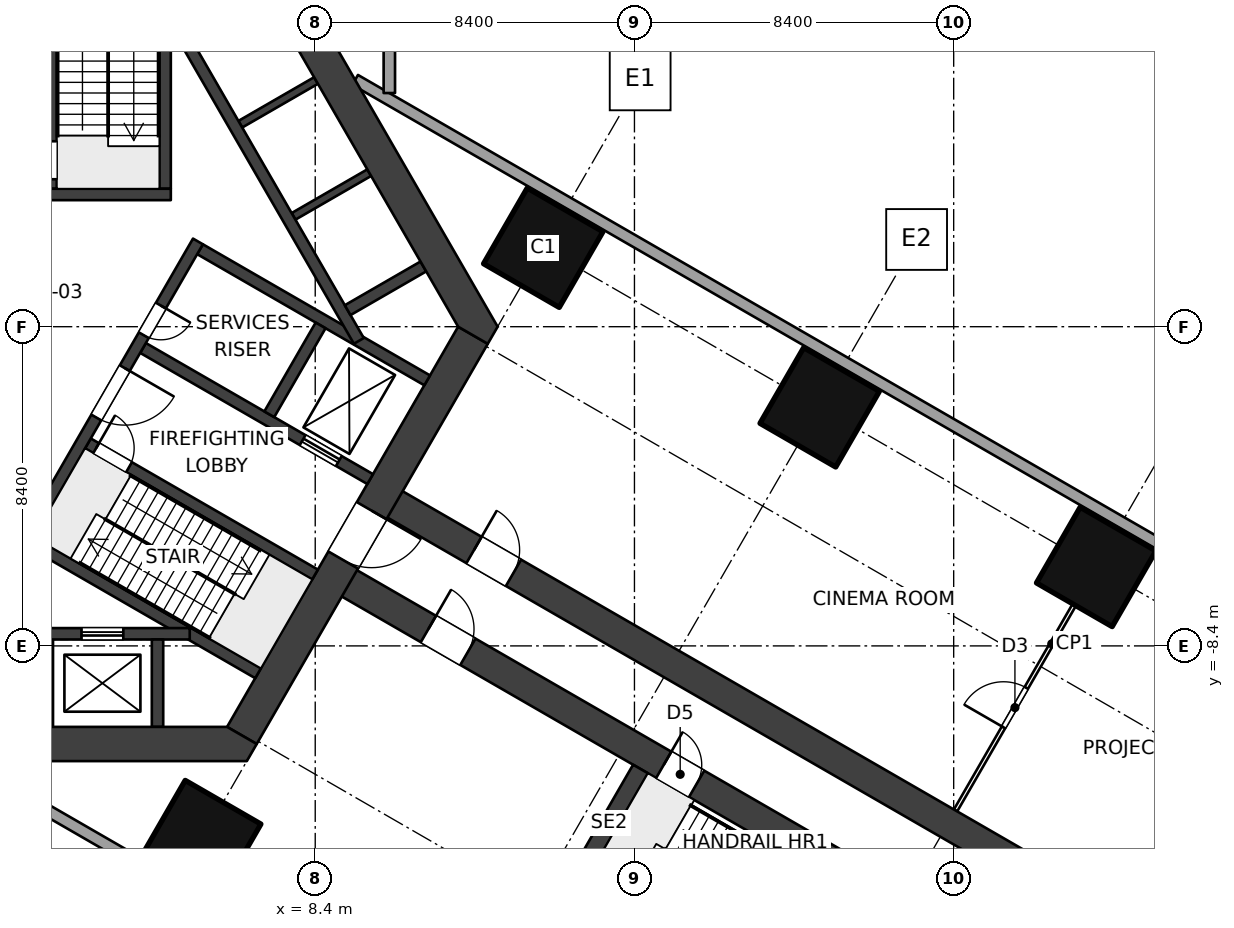
"""IFC4 building model, lengths in metres.
Left out: names, types, materials, properties, quantities, classifications, styles, units other than length and angle.
Written with IfcOpenShell. Run it as: python <this file> out.ifc"""

import sys

from ifc_helpers import new_model, si_unit, direction, frame, frame_2d, origin, origin_2d, place, context, subcontext, project, spatial, polyline, rectangle, outline, extrude, element, fill, save


model = new_model("IFC4")
c1 = context("Model", 3, precision=1e-05, world=origin(), true_north=direction((0.0, 1.0)))
c2 = subcontext(c1, "Body", "Model", "MODEL_VIEW")
j1 = project(units=[si_unit("LENGTHUNIT", "METRE"), si_unit("PLANEANGLEUNIT", "RADIAN")], contexts=[c1])
p1 = place(None, origin())
s1 = spatial("IfcSite", under=j1, at=p1, CompositionType="ELEMENT")
p2 = place(p1, origin())
s2 = spatial("IfcBuilding", under=s1, at=p2, CompositionType="ELEMENT")
p3 = place(p2, frame((0.0, 0.0, 6.0)))
s3 = spatial("IfcBuildingStorey", under=s2, at=p3, CompositionType="ELEMENT", Elevation=6.0)
for number, where, z_axis, x_axis in (
    (1, (14.4, 2.078, 0.0), (0.0, 0.0, 1.0), (-0.5, -0.866, 0.0)),
    (2, (5.4, -13.51, 0.0), (0.0, 0.0, 1.0), (-0.5, -0.866, 0.0)),
    (3, (21.675, -2.122, 0.0), (0.0, 0.0, 1.0), (-0.5, -0.866, 0.0)),
    (4, (28.949, -6.322, 0.0), (0.0, 0.0, 1.0), (-0.5, -0.866, 0.0)),
):
    element("IfcColumn", number, at=place(p3, frame(where, z_axis=z_axis, x_axis=x_axis)), inside=s3, PredefinedType="COLUMN", context=c2, shape_type="SweptSolid", body=[
        extrude(rectangle(XDim=2.3, YDim=2.3, at=origin_2d()), origin(), (0.0, 0.0, 1.0), 5.0),
    ])
p4 = place(p3, frame((12.551, -0.225, 0.0), z_axis=(0.0, 0.0, 1.0), x_axis=(-0.499997612506, -0.8660267822, 0.0)))
e5 = element("IfcWall", 5, at=p4, inside=s3, PredefinedType="SHEAR", context=c2, shape_type="SweptSolid", body=[
    extrude(rectangle(XDim=12.161, YDim=0.9, at=frame_2d((6.08, 0.0))), origin(), (0.0, 0.0, 1.0), 5.0),
])
p5 = place(p4, frame((5.33, 0.0, 0.0)))
e6 = element("IfcOpeningElement", 6, at=p5, cuts=e5, PredefinedType="OPENING", context=c2, shape_type="SweptSolid", body=[
    extrude(rectangle(XDim=1.5, YDim=2.1, at=frame_2d((0.75, 1.05))), frame((0.0, 0.46, 0.0), z_axis=(0.0, -1.0, 0.0), x_axis=(1.0, 0.0, 0.0)), (0.0, 0.0, 1.0), 0.92),
])
p6 = place(p3, origin())
e7 = element("IfcWall", 7, at=p6, inside=s3, PredefinedType="SHEAR", context=c2, shape_type="SweptSolid", body=[
    extrude(outline(polyline([(-6.6, -11.432), (6.6, -11.432), (6.86, -10.981), (6.08, -10.531), (-6.08, -10.531), (-6.86, -10.981), (-6.6, -11.432)])), origin(), (0.0, 0.0, 1.0), 5.0),
])
p7 = place(p3, origin())
e8 = element("IfcWall", 8, at=p7, inside=s3, PredefinedType="SHEAR", context=c2, shape_type="SweptSolid", body=[
    extrude(outline(polyline([(13.2, 0.0), (6.6, 11.432), (6.08, 11.432), (6.08, 10.531), (12.161, 0.0), (12.94, -0.45), (13.2, 0.0)])), origin(), (0.0, 0.0, 1.0), 5.0),
])
p8 = place(p3, frame((-4.6, 3.48, 0.0), z_axis=(0.0, 0.0, 1.0), x_axis=(1.0, 0.0, 0.0)))
e9 = element("IfcWall", 9, at=p8, inside=s3, PredefinedType="SHEAR", context=c2, shape_type="SweptSolid", body=[
    extrude(rectangle(XDim=9.2, YDim=0.3, at=frame_2d((4.6, 0.0))), origin(), (0.0, 0.0, 1.0), 5.0),
])
p9 = place(p8, frame((3.85, 0.0, 0.0)))
e10 = element("IfcOpeningElement", 10, at=p9, cuts=e9, PredefinedType="OPENING", context=c2, shape_type="SweptSolid", body=[
    extrude(rectangle(XDim=1.5, YDim=2.1, at=frame_2d((0.75, 1.05))), frame((0.0, 0.16, 0.0), z_axis=(0.0, -1.0, 0.0), x_axis=(1.0, 0.0, 0.0)), (0.0, 0.0, 1.0), 0.32),
])
p10 = place(p8, frame((1.95, 0.0, 0.0)))
e11 = element("IfcOpeningElement", 11, at=p10, cuts=e9, PredefinedType="OPENING", context=c2, shape_type="SweptSolid", body=[
    extrude(rectangle(XDim=0.9, YDim=2.1, at=frame_2d((0.45, 1.05))), frame((0.0, 0.16, 0.0), z_axis=(0.0, -1.0, 0.0), x_axis=(1.0, 0.0, 0.0)), (0.0, 0.0, 1.0), 0.32),
])
p11 = place(p3, frame((1.45, 3.63, 0.0), z_axis=(0.0, 0.0, 1.0), x_axis=(0.0, 1.0, 0.0)))
e12 = element("IfcWall", 12, at=p11, inside=s3, PredefinedType="SHEAR", context=c2, shape_type="SweptSolid", body=[
    extrude(rectangle(XDim=6.902, YDim=0.3, at=frame_2d((3.451, 0.0))), origin(), (0.0, 0.0, 1.0), 5.0),
])
p12 = place(p11, frame((0.25, 0.0, 0.0)))
e13 = element("IfcOpeningElement", 13, at=p12, cuts=e12, PredefinedType="OPENING", context=c2, shape_type="SweptSolid", body=[
    extrude(rectangle(XDim=1.0, YDim=2.1, at=frame_2d((0.5, 1.05))), frame((0.0, 0.16, 0.0), z_axis=(0.0, -1.0, 0.0), x_axis=(1.0, 0.0, 0.0)), (0.0, 0.0, 1.0), 0.32),
])
p13 = place(p3, frame((4.45, 3.63, 0.0), z_axis=(0.0, 0.0, 1.0), x_axis=(0.0, 1.0, 0.0)))
e14 = element("IfcWall", 14, at=p13, inside=s3, PredefinedType="SHEAR", context=c2, shape_type="SweptSolid", body=[
    extrude(rectangle(XDim=6.902, YDim=0.3, at=frame_2d((3.451, 0.0))), origin(), (0.0, 0.0, 1.0), 5.0),
])
p14 = place(p3, frame((5.314, 2.244, 0.0), z_axis=(0.0, 0.0, 1.0), x_axis=(-0.499995050369, -0.866028261437, 0.0)))
e15 = element("IfcWall", 15, at=p14, inside=s3, PredefinedType="SHEAR", context=c2, shape_type="SweptSolid", body=[
    extrude(rectangle(XDim=9.2, YDim=0.3, at=frame_2d((4.6, 0.0))), origin(), (0.0, 0.0, 1.0), 5.0),
])
p15 = place(p14, frame((3.85, 0.0, 0.0)))
e16 = element("IfcOpeningElement", 16, at=p15, cuts=e15, PredefinedType="OPENING", context=c2, shape_type="SweptSolid", body=[
    extrude(rectangle(XDim=1.5, YDim=2.1, at=frame_2d((0.75, 1.05))), frame((0.0, 0.16, 0.0), z_axis=(0.0, -1.0, 0.0), x_axis=(1.0, 0.0, 0.0)), (0.0, 0.0, 1.0), 0.32),
])
p16 = place(p14, frame((1.95, 0.0, 0.0)))
e17 = element("IfcOpeningElement", 17, at=p16, cuts=e15, PredefinedType="OPENING", context=c2, shape_type="SweptSolid", body=[
    extrude(rectangle(XDim=0.9, YDim=2.1, at=frame_2d((0.45, 1.05))), frame((0.0, 0.16, 0.0), z_axis=(0.0, -1.0, 0.0), x_axis=(1.0, 0.0, 0.0)), (0.0, 0.0, 1.0), 0.32),
])
p17 = place(p3, frame((2.419, -3.071, 0.0), z_axis=(0.0, 0.0, 1.0), x_axis=(0.86602711848, -0.499997030048, 0.0)))
e18 = element("IfcWall", 18, at=p17, inside=s3, PredefinedType="SHEAR", context=c2, shape_type="SweptSolid", body=[
    extrude(rectangle(XDim=6.901, YDim=0.3, at=frame_2d((3.451, 0.0))), origin(), (0.0, 0.0, 1.0), 5.0),
])
p18 = place(p17, frame((0.25, 0.0, 0.0)))
e19 = element("IfcOpeningElement", 19, at=p18, cuts=e18, PredefinedType="OPENING", context=c2, shape_type="SweptSolid", body=[
    extrude(rectangle(XDim=1.0, YDim=2.1, at=frame_2d((0.5, 1.05))), frame((0.0, 0.16, 0.0), z_axis=(0.0, -1.0, 0.0), x_axis=(1.0, 0.0, 0.0)), (0.0, 0.0, 1.0), 0.32),
])
p19 = place(p3, frame((0.919, -5.669, 0.0), z_axis=(0.0, 0.0, 1.0), x_axis=(0.866011800373, -0.500023561059, 0.0)))
e20 = element("IfcWall", 20, at=p19, inside=s3, PredefinedType="SHEAR", context=c2, shape_type="SweptSolid", body=[
    extrude(rectangle(XDim=6.902, YDim=0.3, at=frame_2d((3.451, 0.0))), origin(), (0.0, 0.0, 1.0), 5.0),
])
p20 = place(p3, frame((3.869, -0.559, 0.0), z_axis=(0.0, 0.0, 1.0), x_axis=(0.86602711848, -0.499997030048, 0.0)))
e21 = element("IfcWall", 21, at=p20, inside=s3, PredefinedType="SHEAR", context=c2, shape_type="SweptSolid", body=[
    extrude(rectangle(XDim=6.901, YDim=0.3, at=frame_2d((3.451, 0.0))), origin(), (0.0, 0.0, 1.0), 5.0),
])
p21 = place(p20, frame((4.85, 0.0, 0.0)))
e22 = element("IfcOpeningElement", 22, at=p21, cuts=e21, PredefinedType="OPENING", context=c2, shape_type="SweptSolid", body=[
    extrude(rectangle(XDim=1.1, YDim=2.1, at=frame_2d((0.55, 1.05))), frame((0.0, 0.16, 0.0), z_axis=(0.0, -1.0, 0.0), x_axis=(1.0, 0.0, 0.0)), (0.0, 0.0, 1.0), 0.32),
])
p22 = place(p3, frame((5.369, 2.039, 0.0), z_axis=(0.0, 0.0, 1.0), x_axis=(0.86602711848, -0.499997030048, 0.0)))
e23 = element("IfcWall", 23, at=p22, inside=s3, PredefinedType="SHEAR", context=c2, shape_type="SweptSolid", body=[
    extrude(rectangle(XDim=6.901, YDim=0.3, at=frame_2d((3.451, 0.0))), origin(), (0.0, 0.0, 1.0), 5.0),
])
p23 = place(p3, frame((8.541, 0.034, 0.0), z_axis=(0.0, 0.0, 1.0), x_axis=(-0.50000943426, -0.866019956843, 0.0)))
e24 = element("IfcWall", 24, at=p23, inside=s3, PredefinedType="SHEAR", context=c2, shape_type="SweptSolid", body=[
    extrude(rectangle(XDim=2.7, YDim=0.3, at=frame_2d((1.35, 0.0))), origin(), (0.0, 0.0, 1.0), 5.0),
])
p24 = place(p3, frame((5.098, -8.082, 0.0), z_axis=(0.0, 0.0, 1.0), x_axis=(-1.0, 0.0, 0.0)))
e25 = element("IfcWall", 25, at=p24, inside=s3, PredefinedType="SHEAR", context=c2, shape_type="SweptSolid", body=[
    extrude(rectangle(XDim=10.195, YDim=0.3, at=frame_2d((5.098, 0.0))), origin(), (0.0, 0.0, 1.0), 5.0),
])
p25 = place(p24, frame((1.748, 0.0, 0.0)))
e26 = element("IfcOpeningElement", 26, at=p25, cuts=e25, PredefinedType="OPENING", context=c2, shape_type="SweptSolid", body=[
    extrude(rectangle(XDim=1.1, YDim=2.1, at=frame_2d((0.55, 1.05))), frame((0.0, 0.16, 0.0), z_axis=(0.0, -1.0, 0.0), x_axis=(1.0, 0.0, 0.0)), (0.0, 0.0, 1.0), 0.32),
])
p26 = place(p24, frame((4.548, 0.0, 0.0)))
e27 = element("IfcOpeningElement", 27, at=p26, cuts=e25, PredefinedType="OPENING", context=c2, shape_type="SweptSolid", body=[
    extrude(rectangle(XDim=1.1, YDim=2.1, at=frame_2d((0.55, 1.05))), frame((0.0, 0.16, 0.0), z_axis=(0.0, -1.0, 0.0), x_axis=(1.0, 0.0, 0.0)), (0.0, 0.0, 1.0), 0.32),
])
p27 = place(p24, frame((7.348, 0.0, 0.0)))
e28 = element("IfcOpeningElement", 28, at=p27, cuts=e25, PredefinedType="OPENING", context=c2, shape_type="SweptSolid", body=[
    extrude(rectangle(XDim=1.1, YDim=2.1, at=frame_2d((0.55, 1.05))), frame((0.0, 0.16, 0.0), z_axis=(0.0, -1.0, 0.0), x_axis=(1.0, 0.0, 0.0)), (0.0, 0.0, 1.0), 0.32),
])
p28 = place(p3, frame((4.25, -8.231, 0.0), z_axis=(0.0, 0.0, 1.0), x_axis=(0.0, -1.0, 0.0)))
e29 = element("IfcWall", 29, at=p28, inside=s3, PredefinedType="SHEAR", context=c2, shape_type="SweptSolid", body=[
    extrude(rectangle(XDim=2.3, YDim=0.3, at=frame_2d((1.15, 0.0))), origin(), (0.0, 0.0, 1.0), 5.0),
])
p29 = place(p3, frame((1.4, -8.231, 0.0), z_axis=(0.0, 0.0, 1.0), x_axis=(0.0, -1.0, 0.0)))
e30 = element("IfcWall", 30, at=p29, inside=s3, PredefinedType="SHEAR", context=c2, shape_type="SweptSolid", body=[
    extrude(rectangle(XDim=2.3, YDim=0.2, at=frame_2d((1.15, 0.0))), origin(), (0.0, 0.0, 1.0), 5.0),
])
p30 = place(p3, frame((4.45, 8.455, 0.0), z_axis=(0.0, 0.0, 1.0), x_axis=(0.500002290144, -0.866024081565, 0.0)))
e31 = element("IfcWall", 31, at=p30, inside=s3, PredefinedType="SHEAR", context=c2, shape_type="SweptSolid", body=[
    extrude(rectangle(XDim=10.195, YDim=0.3, at=frame_2d((5.098, 0.0))), origin(), (0.0, 0.0, 1.0), 5.0),
])
p31 = place(p3, frame((9.254, 0.435, 0.0), z_axis=(0.0, 0.0, 1.0), x_axis=(0.866007057882, 0.500031774688, 0.0)))
e32 = element("IfcWall", 32, at=p31, inside=s3, PredefinedType="SHEAR", context=c2, shape_type="SweptSolid", body=[
    extrude(rectangle(XDim=2.3, YDim=0.3, at=frame_2d((1.15, 0.0))), origin(), (0.0, 0.0, 1.0), 5.0),
])
for number, where, z_axis, x_axis in (
    (33, (6.429, 5.328, 0.0), (0.0, 0.0, 1.0), (0.866, 0.5, 0.0)),
    (34, (7.829, 2.903, 0.0), (0.0, 0.0, 1.0), (0.866, 0.5, 0.0)),
):
    element("IfcWall", number, at=place(p3, frame(where, z_axis=z_axis, x_axis=x_axis)), inside=s3, PredefinedType="SHEAR", context=c2, shape_type="SweptSolid", body=[
        extrude(rectangle(XDim=2.3, YDim=0.2, at=frame_2d((1.15, 0.0))), origin(), (0.0, 0.0, 1.0), 5.0),
    ])
p32 = place(p3, frame((10.11, -4.451, 0.0), z_axis=(0.0, 0.0, 1.0), x_axis=(0.866025284237, -0.500000207062, 0.0)))
e35 = element("IfcWall", 35, at=p32, inside=s3, PredefinedType="SHEAR", context=c2, shape_type="SweptSolid", body=[
    extrude(rectangle(XDim=36.75, YDim=0.8, at=frame_2d((18.375, 0.0))), origin(), (0.0, 0.0, 1.0), 5.0),
])
p33 = place(p32, frame((2.85, 0.0, 0.0)))
e36 = element("IfcOpeningElement", 36, at=p33, cuts=e35, PredefinedType="OPENING", context=c2, shape_type="SweptSolid", body=[
    extrude(rectangle(XDim=1.2, YDim=2.1, at=frame_2d((0.6, 1.05))), frame((0.0, 0.41, 0.0), z_axis=(0.0, -1.0, 0.0), x_axis=(1.0, 0.0, 0.0)), (0.0, 0.0, 1.0), 0.82),
])
p34 = place(p3, frame((8.91, -6.53, 0.0), z_axis=(0.0, 0.0, 1.0), x_axis=(0.866025284237, -0.500000207062, 0.0)))
e37 = element("IfcWall", 37, at=p34, inside=s3, PredefinedType="SHEAR", context=c2, shape_type="SweptSolid", body=[
    extrude(rectangle(XDim=36.75, YDim=0.8, at=frame_2d((18.375, 0.0))), origin(), (0.0, 0.0, 1.0), 5.0),
])
p35 = place(p34, frame((10.0, 0.0, 0.0)))
e38 = element("IfcOpeningElement", 38, at=p35, cuts=e37, PredefinedType="OPENING", context=c2, shape_type="SweptSolid", body=[
    extrude(rectangle(XDim=1.0, YDim=2.1, at=frame_2d((0.5, 1.05))), frame((0.0, 0.41, 0.0), z_axis=(0.0, -1.0, 0.0), x_axis=(1.0, 0.0, 0.0)), (0.0, 0.0, 1.0), 0.82),
])
p36 = place(p34, frame((2.85, 0.0, 0.0)))
e39 = element("IfcOpeningElement", 39, at=p36, cuts=e37, PredefinedType="OPENING", context=c2, shape_type="SweptSolid", body=[
    extrude(rectangle(XDim=1.2, YDim=2.1, at=frame_2d((0.6, 1.05))), frame((0.0, 0.41, 0.0), z_axis=(0.0, -1.0, 0.0), x_axis=(1.0, 0.0, 0.0)), (0.0, 0.0, 1.0), 0.82),
])
p37 = place(p3, frame((25.249, -12.73, 0.0), z_axis=(0.0, 0.0, 1.0), x_axis=(0.499987320047, 0.866032724435, 0.0)))
e40 = element("IfcWall", 40, at=p37, inside=s3, PredefinedType="PARTITIONING", context=c2, shape_type="SweptSolid", body=[
    extrude(rectangle(XDim=6.25, YDim=0.1, at=frame_2d((3.125, 0.0))), origin(), (0.0, 0.0, 1.0), 2.9),
])
p38 = place(p37, frame((2.525, 0.0, 0.0)))
e41 = element("IfcOpeningElement", 41, at=p38, cuts=e40, PredefinedType="OPENING", context=c2, shape_type="SweptSolid", body=[
    extrude(rectangle(XDim=1.2, YDim=2.1, at=frame_2d((0.6, 1.05))), frame((0.0, 0.06, 0.0), z_axis=(0.0, -1.0, 0.0), x_axis=(1.0, 0.0, 0.0)), (0.0, 0.0, 1.0), 0.12),
])
p39 = place(p3, frame((10.35, 6.149, 0.0), z_axis=(0.0, 0.0, 1.0), x_axis=(0.0, 1.0, 0.0)))
e42 = element("IfcWall", 42, at=p39, inside=s3, PredefinedType="SOLIDWALL", context=c2, shape_type="SweptSolid", body=[
    extrude(rectangle(XDim=41.883, YDim=0.3, at=frame_2d((20.941, 0.0))), origin(), (0.0, 0.0, 1.0), 4.7),
])
p40 = place(p39, frame((25.383, 0.0, 0.0)))
e43 = element("IfcOpeningElement", 43, at=p40, cuts=e42, PredefinedType="OPENING", context=c2, shape_type="SweptSolid", body=[
    extrude(rectangle(XDim=1.8, YDim=2.4, at=frame_2d((0.9, 1.2))), frame((0.0, 0.16, 0.0), z_axis=(0.0, -1.0, 0.0), x_axis=(1.0, 0.0, 0.0)), (0.0, 0.0, 1.0), 0.32),
])
p41 = place(p3, frame((9.45, 6.495, 0.0), z_axis=(0.0, 0.0, 1.0), x_axis=(0.866025301493, -0.500000177174, 0.0)))
e44 = element("IfcWall", 44, at=p41, inside=s3, PredefinedType="SOLIDWALL", context=c2, shape_type="SweptSolid", body=[
    extrude(rectangle(XDim=43.095, YDim=0.3, at=frame_2d((21.548, 0.0))), origin(), (0.0, 0.0, 1.0), 4.7),
])
p42 = place(p41, frame((26.595, 0.0, 0.0)))
e45 = element("IfcOpeningElement", 45, at=p42, cuts=e44, PredefinedType="OPENING", context=c2, shape_type="SweptSolid", body=[
    extrude(rectangle(XDim=1.8, YDim=2.4, at=frame_2d((0.9, 1.2))), frame((0.0, 0.16, 0.0), z_axis=(0.0, -1.0, 0.0), x_axis=(1.0, 0.0, 0.0)), (0.0, 0.0, 1.0), 0.32),
])
p43 = place(p3, frame((-0.9, -11.432, 0.0), z_axis=(0.0, 0.0, 1.0), x_axis=(0.866025301493, -0.500000177174, 0.0)))
e46 = element("IfcWall", 46, at=p43, inside=s3, PredefinedType="SOLIDWALL", context=c2, shape_type="SweptSolid", body=[
    extrude(rectangle(XDim=43.095, YDim=0.3, at=frame_2d((21.548, 0.0))), origin(), (0.0, 0.0, 1.0), 4.7),
])
p44 = place(p43, frame((26.595, 0.0, 0.0)))
e47 = element("IfcOpeningElement", 47, at=p44, cuts=e46, PredefinedType="OPENING", context=c2, shape_type="SweptSolid", body=[
    extrude(rectangle(XDim=1.8, YDim=2.4, at=frame_2d((0.9, 1.2))), frame((0.0, 0.16, 0.0), z_axis=(0.0, -1.0, 0.0), x_axis=(1.0, 0.0, 0.0)), (0.0, 0.0, 1.0), 0.32),
])
p45 = place(p3, frame((16.959, -11.639, 0.0), z_axis=(0.0, 0.0, 1.0), x_axis=(-0.50002983664, -0.866008176907, 0.0)))
e48 = element("IfcWall", 48, at=p45, inside=s3, PredefinedType="SOLIDWALL", context=c2, shape_type="SweptSolid", body=[
    extrude(rectangle(XDim=3.3, YDim=0.45, at=frame_2d((1.65, 0.0))), origin(), (0.0, 0.0, 1.0), 5.0),
])
p46 = place(p25, origin())
e49 = element("IfcDoor", 49, at=p46, inside=s3, OperationType="DOUBLE_DOOR_SLIDING", PredefinedType="DOOR", context=c2, shape_type="SweptSolid", body=[
    extrude(rectangle(XDim=1.1, YDim=2.1, at=frame_2d((0.55, 1.05))), frame((0.0, 0.025, 0.0), z_axis=(0.0, -1.0, 0.0), x_axis=(1.0, 0.0, 0.0)), (0.0, 0.0, 1.0), 0.05),
])
fill(e26, e49)
p47 = place(p21, origin())
e50 = element("IfcDoor", 50, at=p47, inside=s3, OperationType="DOUBLE_DOOR_SLIDING", PredefinedType="DOOR", context=c2, shape_type="SweptSolid", body=[
    extrude(rectangle(XDim=1.1, YDim=2.1, at=frame_2d((0.55, 1.05))), frame((0.0, 0.025, 0.0), z_axis=(0.0, -1.0, 0.0), x_axis=(1.0, 0.0, 0.0)), (0.0, 0.0, 1.0), 0.05),
])
fill(e22, e50)
p48 = place(p15, origin())
e51 = element("IfcDoor", 51, at=p48, inside=s3, OperationType="DOUBLE_DOOR_DOUBLE_SWING", PredefinedType="DOOR", context=c2, shape_type="SweptSolid", body=[
    extrude(rectangle(XDim=1.5, YDim=2.1, at=frame_2d((0.75, 1.05))), frame((0.0, 0.025, 0.0), z_axis=(0.0, -1.0, 0.0), x_axis=(1.0, 0.0, 0.0)), (0.0, 0.0, 1.0), 0.05),
])
fill(e16, e51)
p49 = place(p16, origin())
e52 = element("IfcDoor", 52, at=p49, inside=s3, OperationType="SINGLE_SWING_LEFT", PredefinedType="DOOR", context=c2, shape_type="SweptSolid", body=[
    extrude(rectangle(XDim=0.9, YDim=2.1, at=frame_2d((0.45, 1.05))), frame((0.0, 0.025, 0.0), z_axis=(0.0, -1.0, 0.0), x_axis=(1.0, 0.0, 0.0)), (0.0, 0.0, 1.0), 0.05),
])
fill(e17, e52)
p50 = place(p18, origin())
e53 = element("IfcDoor", 53, at=p50, inside=s3, OperationType="SINGLE_SWING_LEFT", PredefinedType="DOOR", context=c2, shape_type="SweptSolid", body=[
    extrude(rectangle(XDim=1.0, YDim=2.1, at=frame_2d((0.5, 1.05))), frame((0.0, 0.025, 0.0), z_axis=(0.0, -1.0, 0.0), x_axis=(1.0, 0.0, 0.0)), (0.0, 0.0, 1.0), 0.05),
])
fill(e19, e53)
p51 = place(p5, origin())
e54 = element("IfcDoor", 54, at=p51, inside=s3, OperationType="DOUBLE_DOOR_DOUBLE_SWING", PredefinedType="DOOR", context=c2, shape_type="SweptSolid", body=[
    extrude(rectangle(XDim=1.5, YDim=2.1, at=frame_2d((0.75, 1.05))), frame((0.0, 0.025, 0.0), z_axis=(0.0, -1.0, 0.0), x_axis=(1.0, 0.0, 0.0)), (0.0, 0.0, 1.0), 0.05),
])
fill(e6, e54)
p52 = place(p35, origin())
e55 = element("IfcDoor", 55, at=p52, inside=s3, OperationType="SINGLE_SWING_LEFT", PredefinedType="DOOR", context=c2, shape_type="SweptSolid", body=[
    extrude(rectangle(XDim=1.0, YDim=2.1, at=frame_2d((0.5, 1.05))), frame((0.0, 0.025, 0.0), z_axis=(0.0, -1.0, 0.0), x_axis=(1.0, 0.0, 0.0)), (0.0, 0.0, 1.0), 0.05),
])
fill(e38, e55)
p53 = place(p38, origin())
e56 = element("IfcDoor", 56, at=p53, inside=s3, OperationType="DOUBLE_SWING_LEFT", PredefinedType="DOOR", context=c2, shape_type="SweptSolid", body=[
    extrude(rectangle(XDim=1.2, YDim=2.1, at=frame_2d((0.6, 1.05))), frame((0.0, 0.025, 0.0), z_axis=(0.0, -1.0, 0.0), x_axis=(1.0, 0.0, 0.0)), (0.0, 0.0, 1.0), 0.05),
])
fill(e41, e56)
p54 = place(p33, origin())
e57 = element("IfcDoor", 57, at=p54, inside=s3, OperationType="DOUBLE_SWING_LEFT", PredefinedType="DOOR", context=c2, shape_type="SweptSolid", body=[
    extrude(rectangle(XDim=1.2, YDim=2.1, at=frame_2d((0.6, 1.05))), frame((0.0, 0.025, 0.0), z_axis=(0.0, -1.0, 0.0), x_axis=(1.0, 0.0, 0.0)), (0.0, 0.0, 1.0), 0.05),
])
fill(e36, e57)
p55 = place(p36, origin())
e58 = element("IfcDoor", 58, at=p55, inside=s3, OperationType="DOUBLE_SWING_LEFT", PredefinedType="DOOR", context=c2, shape_type="SweptSolid", body=[
    extrude(rectangle(XDim=1.2, YDim=2.1, at=frame_2d((0.6, 1.05))), frame((0.0, 0.025, 0.0), z_axis=(0.0, -1.0, 0.0), x_axis=(1.0, 0.0, 0.0)), (0.0, 0.0, 1.0), 0.05),
])
fill(e39, e58)
save(model, sys.argv[1])
